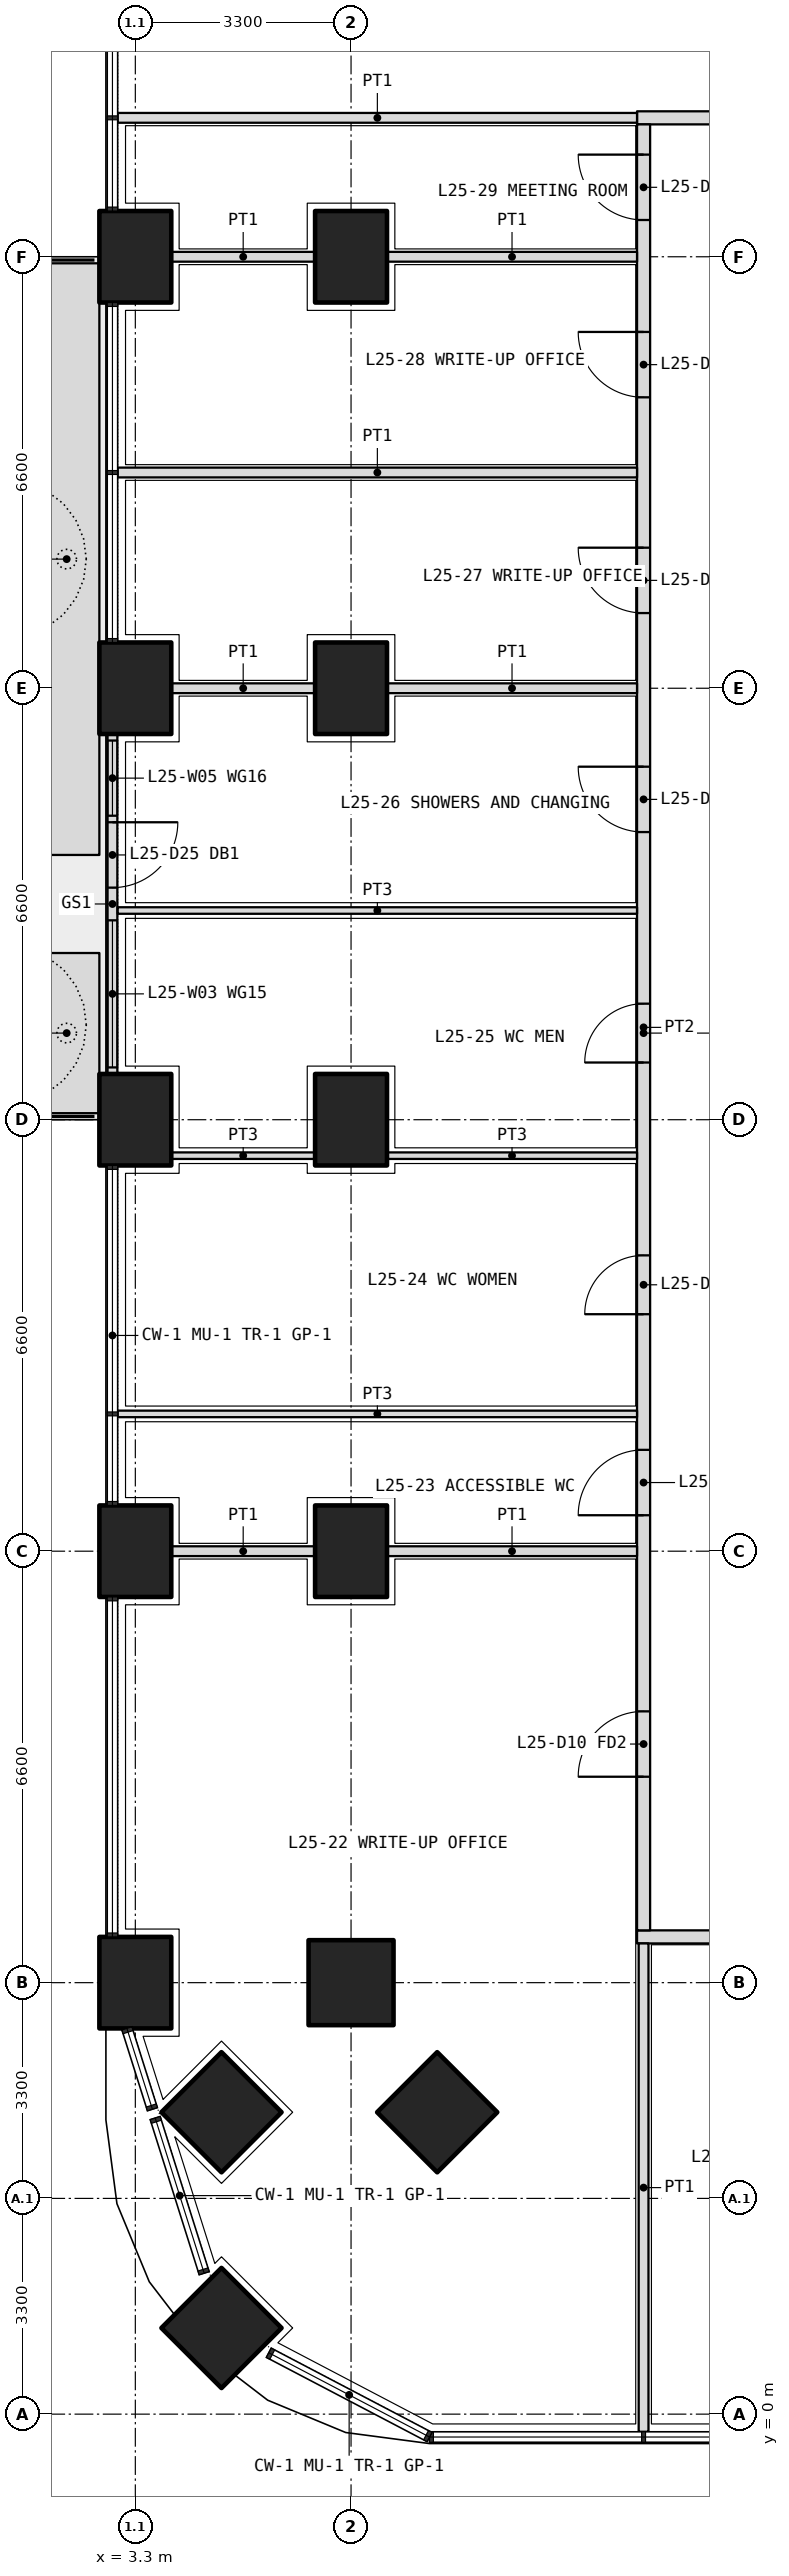
"""IFC4 building model, lengths in metres.
Left out: names, types, materials, properties, quantities, classifications, styles, units other than length and angle.
Written with IfcOpenShell. Run it as: python <this file> out.ifc"""

import sys

from ifc_helpers import new_model, si_unit, direction, frame, frame_2d, origin, origin_2d, place, context, subcontext, project, spatial, polyline, rectangle, outline, extrude, element, fill, save


model = new_model("IFC4")
c1 = context("Model", 3, precision=1e-05, world=origin(), true_north=direction((0.0, 1.0)))
c2 = subcontext(c1, "Body", "Model", "MODEL_VIEW")
j1 = project(units=[si_unit("LENGTHUNIT", "METRE"), si_unit("PLANEANGLEUNIT", "RADIAN")], contexts=[c1])
p1 = place(None, origin())
s1 = spatial("IfcSite", under=j1, at=p1, CompositionType="ELEMENT")
p2 = place(p1, origin())
s2 = spatial("IfcBuilding", under=s1, at=p2, CompositionType="ELEMENT")
p3 = place(p2, frame((0.0, 0.0, 111.6)))
s3 = spatial("IfcBuildingStorey", under=s2, at=p3, CompositionType="ELEMENT", Elevation=111.6)
p4 = place(p3, frame((4.618, 1.318, 0.0), z_axis=(0.0, 0.0, 1.0), x_axis=(0.707106781187, 0.707106781187, 0.0)))
e1 = element("IfcColumn", 1, at=p4, inside=s3, PredefinedType="COLUMN", context=c2, shape_type="SweptSolid", body=[
    extrude(rectangle(XDim=1.3, YDim=1.3, at=origin_2d()), origin(), (0.0, 0.0, 1.0), 4.2),
])
for number, where, z_axis, x_axis in (
    (2, (3.3, 6.6, 0.0), (0.0, 0.0, 1.0), (0.0, 1.0, 0.0)),
    (3, (3.3, 13.2, 0.0), (0.0, 0.0, 1.0), (0.0, 1.0, 0.0)),
    (4, (3.3, 19.8, 0.0), (0.0, 0.0, 1.0), (0.0, 1.0, 0.0)),
    (5, (3.3, 26.4, 0.0), (0.0, 0.0, 1.0), (0.0, 1.0, 0.0)),
    (6, (3.3, 33.0, 0.0), (0.0, 0.0, 1.0), (0.0, 1.0, 0.0)),
):
    element("IfcColumn", number, at=place(p3, frame(where, z_axis=z_axis, x_axis=x_axis)), inside=s3, PredefinedType="COLUMN", context=c2, shape_type="SweptSolid", body=[
        extrude(rectangle(XDim=1.4, YDim=1.1, at=origin_2d()), origin(), (0.0, 0.0, 1.0), 4.2),
    ])
for number, where, z_axis, x_axis in (
    (7, (6.6, 6.6, 0.0), (0.0, 0.0, 1.0), (1.0, 0.0, 0.0)),
    (8, (4.618, 4.618, 0.0), (0.0, 0.0, 1.0), (0.707, 0.707, 0.0)),
    (9, (7.918, 4.618, 0.0), (0.0, 0.0, 1.0), (0.707, 0.707, 0.0)),
):
    element("IfcColumn", number, at=place(p3, frame(where, z_axis=z_axis, x_axis=x_axis)), inside=s3, PredefinedType="COLUMN", context=c2, shape_type="SweptSolid", body=[
        extrude(rectangle(XDim=1.3, YDim=1.3, at=origin_2d()), origin(), (0.0, 0.0, 1.0), 4.2),
    ])
for number, where, z_axis, x_axis in (
    (10, (6.6, 13.2, 0.0), (0.0, 0.0, 1.0), (0.0, 1.0, 0.0)),
    (11, (6.6, 19.8, 0.0), (0.0, 0.0, 1.0), (0.0, 1.0, 0.0)),
    (12, (6.6, 26.4, 0.0), (0.0, 0.0, 1.0), (0.0, 1.0, 0.0)),
    (13, (6.6, 33.0, 0.0), (0.0, 0.0, 1.0), (0.0, 1.0, 0.0)),
):
    element("IfcColumn", number, at=place(p3, frame(where, z_axis=z_axis, x_axis=x_axis)), inside=s3, PredefinedType="COLUMN", context=c2, shape_type="SweptSolid", body=[
        extrude(rectangle(XDim=1.4, YDim=1.1, at=origin_2d()), origin(), (0.0, 0.0, 1.0), 4.2),
    ])
p5 = place(p3, origin())
e14 = element("IfcWall", 14, at=p5, inside=s3, PredefinedType="USERDEFINED", context=c2, shape_type="SweptSolid", body=[
    extrude(outline(polyline([(1.75, 19.9), (2.75, 19.9), (2.75, 22.35), (1.75, 22.35), (1.75, 19.9)]), holes=[polyline([(1.9, 20.05), (2.6, 20.05), (2.6, 22.2), (1.9, 22.2), (1.9, 20.05)])]), origin(), (0.0, 0.0, 1.0), 1.05),
])
p6 = place(p3, origin())
e15 = element("IfcWall", 15, at=p6, inside=s3, PredefinedType="USERDEFINED", context=c2, shape_type="SweptSolid", body=[
    extrude(outline(polyline([(1.75, 23.85), (2.75, 23.85), (2.75, 32.9), (1.75, 32.9), (1.75, 23.85)]), holes=[polyline([(1.9, 24.0), (2.6, 24.0), (2.6, 32.75), (1.9, 32.75), (1.9, 24.0)])]), origin(), (0.0, 0.0, 1.0), 1.05),
])
p7 = place(p3, frame((2.95, 25.7, 0.0), z_axis=(0.0, 0.0, 1.0), x_axis=(0.0, -1.0, 0.0)))
e16 = element("IfcWall", 16, at=p7, inside=s3, PredefinedType="SOLIDWALL", context=c2, shape_type="SweptSolid", body=[
    extrude(rectangle(XDim=5.2, YDim=0.15, at=frame_2d((2.6, 0.0))), origin(), (0.0, 0.0, 1.0), 2.7),
])
p8 = place(p7, frame((1.35, 0.0, 0.0)))
e17 = element("IfcOpeningElement", 17, at=p8, cuts=e16, PredefinedType="OPENING", context=c2, shape_type="SweptSolid", body=[
    extrude(rectangle(XDim=1.0, YDim=2.4, at=frame_2d((0.5, 1.2))), frame((0.0, 0.085, 0.0), z_axis=(0.0, -1.0, 0.0), x_axis=(1.0, 0.0, 0.0)), (0.0, 0.0, 1.0), 0.17),
])
p9 = place(p7, frame((0.1, 0.0, 0.1)))
e18 = element("IfcOpeningElement", 18, at=p9, cuts=e16, PredefinedType="OPENING", context=c2, shape_type="SweptSolid", body=[
    extrude(rectangle(XDim=1.15, YDim=2.3, at=frame_2d((0.575, 1.15))), frame((0.0, 0.085, 0.0), z_axis=(0.0, -1.0, 0.0), x_axis=(1.0, 0.0, 0.0)), (0.0, 0.0, 1.0), 0.17),
])
p10 = place(p7, frame((2.85, 0.0, 0.1)))
e19 = element("IfcOpeningElement", 19, at=p10, cuts=e16, PredefinedType="OPENING", context=c2, shape_type="SweptSolid", body=[
    extrude(rectangle(XDim=2.25, YDim=2.3, at=frame_2d((1.125, 1.15))), frame((0.0, 0.085, 0.0), z_axis=(0.0, -1.0, 0.0), x_axis=(1.0, 0.0, 0.0)), (0.0, 0.0, 1.0), 0.17),
])
p11 = place(p3, frame((10.975, 7.3, 0.0), z_axis=(0.0, 0.0, 1.0), x_axis=(1.0, 0.0, 0.0)))
e20 = element("IfcWall", 20, at=p11, inside=s3, PredefinedType="PARTITIONING", context=c2, shape_type="SweptSolid", body=[
    extrude(rectangle(XDim=12.125, YDim=0.2, at=frame_2d((6.062, 0.0))), origin(), (0.0, 0.0, 1.0), 2.85),
])
p12 = place(p11, frame((2.312, 0.0, 0.0)))
e21 = element("IfcOpeningElement", 21, at=p12, cuts=e20, PredefinedType="OPENING", context=c2, shape_type="SweptSolid", body=[
    extrude(rectangle(XDim=1.0, YDim=2.1, at=frame_2d((0.5, 1.05))), frame((0.0, 0.11, 0.0), z_axis=(0.0, -1.0, 0.0), x_axis=(1.0, 0.0, 0.0)), (0.0, 0.0, 1.0), 0.22),
])
p13 = place(p11, frame((7.125, 0.0, 0.0)))
e22 = element("IfcOpeningElement", 22, at=p13, cuts=e20, PredefinedType="OPENING", context=c2, shape_type="SweptSolid", body=[
    extrude(rectangle(XDim=1.0, YDim=2.1, at=frame_2d((0.5, 1.05))), frame((0.0, 0.11, 0.0), z_axis=(0.0, -1.0, 0.0), x_axis=(1.0, 0.0, 0.0)), (0.0, 0.0, 1.0), 0.22),
])
p14 = place(p11, frame((10.425, 0.0, 0.0)))
e23 = element("IfcOpeningElement", 23, at=p14, cuts=e20, PredefinedType="OPENING", context=c2, shape_type="SweptSolid", body=[
    extrude(rectangle(XDim=1.0, YDim=2.1, at=frame_2d((0.5, 1.05))), frame((0.0, 0.11, 0.0), z_axis=(0.0, -1.0, 0.0), x_axis=(1.0, 0.0, 0.0)), (0.0, 0.0, 1.0), 0.22),
])
p15 = place(p3, frame((10.975, 35.125, 0.0), z_axis=(0.0, 0.0, 1.0), x_axis=(1.0, 0.0, 0.0)))
e24 = element("IfcWall", 24, at=p15, inside=s3, PredefinedType="PARTITIONING", context=c2, shape_type="SweptSolid", body=[
    extrude(rectangle(XDim=30.85, YDim=0.2, at=frame_2d((15.425, 0.0))), origin(), (0.0, 0.0, 1.0), 2.85),
])
p16 = place(p15, frame((3.962, 0.0, 0.0)))
e25 = element("IfcOpeningElement", 25, at=p16, cuts=e24, PredefinedType="OPENING", context=c2, shape_type="SweptSolid", body=[
    extrude(rectangle(XDim=1.0, YDim=2.1, at=frame_2d((0.5, 1.05))), frame((0.0, 0.11, 0.0), z_axis=(0.0, -1.0, 0.0), x_axis=(1.0, 0.0, 0.0)), (0.0, 0.0, 1.0), 0.22),
])
p17 = place(p15, frame((9.975, 0.0, 0.0)))
e26 = element("IfcOpeningElement", 26, at=p17, cuts=e24, PredefinedType="OPENING", context=c2, shape_type="SweptSolid", body=[
    extrude(rectangle(XDim=1.0, YDim=2.1, at=frame_2d((0.5, 1.05))), frame((0.0, 0.11, 0.0), z_axis=(0.0, -1.0, 0.0), x_axis=(1.0, 0.0, 0.0)), (0.0, 0.0, 1.0), 0.22),
])
p18 = place(p15, frame((14.825, 0.0, 0.0)))
e27 = element("IfcOpeningElement", 27, at=p18, cuts=e24, PredefinedType="OPENING", context=c2, shape_type="SweptSolid", body=[
    extrude(rectangle(XDim=1.2, YDim=2.1, at=frame_2d((0.6, 1.05))), frame((0.0, 0.11, 0.0), z_axis=(0.0, -1.0, 0.0), x_axis=(1.0, 0.0, 0.0)), (0.0, 0.0, 1.0), 0.22),
])
p19 = place(p15, frame((24.238, 0.0, 0.0)))
e28 = element("IfcOpeningElement", 28, at=p19, cuts=e24, PredefinedType="OPENING", context=c2, shape_type="SweptSolid", body=[
    extrude(rectangle(XDim=1.0, YDim=2.1, at=frame_2d((0.5, 1.05))), frame((0.0, 0.11, 0.0), z_axis=(0.0, -1.0, 0.0), x_axis=(1.0, 0.0, 0.0)), (0.0, 0.0, 1.0), 0.22),
])
p20 = place(p3, frame((11.075, 7.4, 0.0), z_axis=(0.0, 0.0, 1.0), x_axis=(0.0, 1.0, 0.0)))
e29 = element("IfcWall", 29, at=p20, inside=s3, PredefinedType="PARTITIONING", context=c2, shape_type="SweptSolid", body=[
    extrude(rectangle(XDim=27.625, YDim=0.2, at=frame_2d((13.812, 0.0))), origin(), (0.0, 0.0, 1.0), 2.85),
])
p21 = place(p20, frame((2.35, 0.0, 0.0)))
e30 = element("IfcOpeningElement", 30, at=p21, cuts=e29, PredefinedType="OPENING", context=c2, shape_type="SweptSolid", body=[
    extrude(rectangle(XDim=1.0, YDim=2.1, at=frame_2d((0.5, 1.05))), frame((0.0, 0.11, 0.0), z_axis=(0.0, -1.0, 0.0), x_axis=(1.0, 0.0, 0.0)), (0.0, 0.0, 1.0), 0.22),
])
p22 = place(p20, frame((6.35, 0.0, 0.0)))
e31 = element("IfcOpeningElement", 31, at=p22, cuts=e29, PredefinedType="OPENING", context=c2, shape_type="SweptSolid", body=[
    extrude(rectangle(XDim=1.0, YDim=2.1, at=frame_2d((0.5, 1.05))), frame((0.0, 0.11, 0.0), z_axis=(0.0, -1.0, 0.0), x_axis=(1.0, 0.0, 0.0)), (0.0, 0.0, 1.0), 0.22),
])
p23 = place(p20, frame((9.425, 0.0, 0.0)))
e32 = element("IfcOpeningElement", 32, at=p23, cuts=e29, PredefinedType="OPENING", context=c2, shape_type="SweptSolid", body=[
    extrude(rectangle(XDim=0.9, YDim=2.1, at=frame_2d((0.45, 1.05))), frame((0.0, 0.11, 0.0), z_axis=(0.0, -1.0, 0.0), x_axis=(1.0, 0.0, 0.0)), (0.0, 0.0, 1.0), 0.22),
])
p24 = place(p20, frame((13.275, 0.0, 0.0)))
e33 = element("IfcOpeningElement", 33, at=p24, cuts=e29, PredefinedType="OPENING", context=c2, shape_type="SweptSolid", body=[
    extrude(rectangle(XDim=0.9, YDim=2.1, at=frame_2d((0.45, 1.05))), frame((0.0, 0.11, 0.0), z_axis=(0.0, -1.0, 0.0), x_axis=(1.0, 0.0, 0.0)), (0.0, 0.0, 1.0), 0.22),
])
p25 = place(p20, frame((16.8, 0.0, 0.0)))
e34 = element("IfcOpeningElement", 34, at=p25, cuts=e29, PredefinedType="OPENING", context=c2, shape_type="SweptSolid", body=[
    extrude(rectangle(XDim=1.0, YDim=2.1, at=frame_2d((0.5, 1.05))), frame((0.0, 0.11, 0.0), z_axis=(0.0, -1.0, 0.0), x_axis=(1.0, 0.0, 0.0)), (0.0, 0.0, 1.0), 0.22),
])
p26 = place(p20, frame((20.15, 0.0, 0.0)))
e35 = element("IfcOpeningElement", 35, at=p26, cuts=e29, PredefinedType="OPENING", context=c2, shape_type="SweptSolid", body=[
    extrude(rectangle(XDim=1.0, YDim=2.1, at=frame_2d((0.5, 1.05))), frame((0.0, 0.11, 0.0), z_axis=(0.0, -1.0, 0.0), x_axis=(1.0, 0.0, 0.0)), (0.0, 0.0, 1.0), 0.22),
])
p27 = place(p20, frame((23.45, 0.0, 0.0)))
e36 = element("IfcOpeningElement", 36, at=p27, cuts=e29, PredefinedType="OPENING", context=c2, shape_type="SweptSolid", body=[
    extrude(rectangle(XDim=1.0, YDim=2.1, at=frame_2d((0.5, 1.05))), frame((0.0, 0.11, 0.0), z_axis=(0.0, -1.0, 0.0), x_axis=(1.0, 0.0, 0.0)), (0.0, 0.0, 1.0), 0.22),
])
p28 = place(p20, frame((26.163, 0.0, 0.0)))
e37 = element("IfcOpeningElement", 37, at=p28, cuts=e29, PredefinedType="OPENING", context=c2, shape_type="SweptSolid", body=[
    extrude(rectangle(XDim=1.0, YDim=2.1, at=frame_2d((0.5, 1.05))), frame((0.0, 0.11, 0.0), z_axis=(0.0, -1.0, 0.0), x_axis=(1.0, 0.0, 0.0)), (0.0, 0.0, 1.0), 0.22),
])
p29 = place(p3, frame((11.075, -0.27, 0.0), z_axis=(0.0, 0.0, 1.0), x_axis=(0.0, 1.0, 0.0)))
e38 = element("IfcWall", 38, at=p29, inside=s3, PredefinedType="PARTITIONING", context=c2, shape_type="SweptSolid", body=[
    extrude(rectangle(XDim=7.47, YDim=0.15, at=frame_2d((3.735, 0.0))), origin(), (0.0, 0.0, 1.0), 2.7),
])
p30 = place(p3, frame((3.03, 35.125, 0.0), z_axis=(0.0, 0.0, 1.0), x_axis=(1.0, 0.0, 0.0)))
e39 = element("IfcWall", 39, at=p30, inside=s3, PredefinedType="PARTITIONING", context=c2, shape_type="SweptSolid", body=[
    extrude(rectangle(XDim=7.945, YDim=0.15, at=frame_2d((3.973, 0.0))), origin(), (0.0, 0.0, 1.0), 2.7),
])
p31 = place(p3, frame((3.03, 15.3, 0.0), z_axis=(0.0, 0.0, 1.0), x_axis=(1.0, 0.0, 0.0)))
e40 = element("IfcWall", 40, at=p31, inside=s3, PredefinedType="PARTITIONING", context=c2, shape_type="SweptSolid", body=[
    extrude(rectangle(XDim=7.945, YDim=0.1, at=frame_2d((3.973, 0.0))), origin(), (0.0, 0.0, 1.0), 2.7),
])
p32 = place(p3, frame((3.85, 19.25, 0.0), z_axis=(0.0, 0.0, 1.0), x_axis=(1.0, 0.0, 0.0)))
e41 = element("IfcWall", 41, at=p32, inside=s3, PredefinedType="PARTITIONING", context=c2, shape_type="SweptSolid", body=[
    extrude(rectangle(XDim=2.2, YDim=0.1, at=frame_2d((1.1, 0.0))), origin(), (0.0, 0.0, 1.0), 2.85),
])
p33 = place(p3, frame((7.15, 19.25, 0.0), z_axis=(0.0, 0.0, 1.0), x_axis=(1.0, 0.0, 0.0)))
e42 = element("IfcWall", 42, at=p33, inside=s3, PredefinedType="PARTITIONING", context=c2, shape_type="SweptSolid", body=[
    extrude(rectangle(XDim=3.825, YDim=0.1, at=frame_2d((1.913, 0.0))), origin(), (0.0, 0.0, 1.0), 2.85),
])
p34 = place(p3, frame((3.03, 23.0, 0.0), z_axis=(0.0, 0.0, 1.0), x_axis=(1.0, 0.0, 0.0)))
e43 = element("IfcWall", 43, at=p34, inside=s3, PredefinedType="PARTITIONING", context=c2, shape_type="SweptSolid", body=[
    extrude(rectangle(XDim=7.945, YDim=0.1, at=frame_2d((3.973, 0.0))), origin(), (0.0, 0.0, 1.0), 2.7),
])
p35 = place(p3, frame((3.85, 13.2, 0.0), z_axis=(0.0, 0.0, 1.0), x_axis=(1.0, 0.0, 0.0)))
e44 = element("IfcWall", 44, at=p35, inside=s3, PredefinedType="PARTITIONING", context=c2, shape_type="SweptSolid", body=[
    extrude(rectangle(XDim=2.2, YDim=0.15, at=frame_2d((1.1, 0.0))), origin(), (0.0, 0.0, 1.0), 2.85),
])
p36 = place(p3, frame((7.15, 13.2, 0.0), z_axis=(0.0, 0.0, 1.0), x_axis=(1.0, 0.0, 0.0)))
e45 = element("IfcWall", 45, at=p36, inside=s3, PredefinedType="PARTITIONING", context=c2, shape_type="SweptSolid", body=[
    extrude(rectangle(XDim=3.825, YDim=0.15, at=frame_2d((1.913, 0.0))), origin(), (0.0, 0.0, 1.0), 2.85),
])
p37 = place(p3, frame((3.85, 26.4, 0.0), z_axis=(0.0, 0.0, 1.0), x_axis=(1.0, 0.0, 0.0)))
e46 = element("IfcWall", 46, at=p37, inside=s3, PredefinedType="PARTITIONING", context=c2, shape_type="SweptSolid", body=[
    extrude(rectangle(XDim=2.2, YDim=0.15, at=frame_2d((1.1, 0.0))), origin(), (0.0, 0.0, 1.0), 2.85),
])
p38 = place(p3, frame((7.15, 26.4, 0.0), z_axis=(0.0, 0.0, 1.0), x_axis=(1.0, 0.0, 0.0)))
e47 = element("IfcWall", 47, at=p38, inside=s3, PredefinedType="PARTITIONING", context=c2, shape_type="SweptSolid", body=[
    extrude(rectangle(XDim=3.825, YDim=0.15, at=frame_2d((1.913, 0.0))), origin(), (0.0, 0.0, 1.0), 2.85),
])
p39 = place(p3, frame((3.03, 29.7, 0.0), z_axis=(0.0, 0.0, 1.0), x_axis=(1.0, 0.0, 0.0)))
e48 = element("IfcWall", 48, at=p39, inside=s3, PredefinedType="PARTITIONING", context=c2, shape_type="SweptSolid", body=[
    extrude(rectangle(XDim=7.945, YDim=0.15, at=frame_2d((3.973, 0.0))), origin(), (0.0, 0.0, 1.0), 2.7),
])
p40 = place(p3, frame((3.85, 33.0, 0.0), z_axis=(0.0, 0.0, 1.0), x_axis=(1.0, 0.0, 0.0)))
e49 = element("IfcWall", 49, at=p40, inside=s3, PredefinedType="PARTITIONING", context=c2, shape_type="SweptSolid", body=[
    extrude(rectangle(XDim=2.2, YDim=0.15, at=frame_2d((1.1, 0.0))), origin(), (0.0, 0.0, 1.0), 2.85),
])
p41 = place(p3, frame((7.15, 33.0, 0.0), z_axis=(0.0, 0.0, 1.0), x_axis=(1.0, 0.0, 0.0)))
e50 = element("IfcWall", 50, at=p41, inside=s3, PredefinedType="PARTITIONING", context=c2, shape_type="SweptSolid", body=[
    extrude(rectangle(XDim=3.825, YDim=0.15, at=frame_2d((1.913, 0.0))), origin(), (0.0, 0.0, 1.0), 2.85),
])
p42 = place(p8, origin())
e51 = element("IfcDoor", 51, at=p42, inside=s3, OperationType="SINGLE_SWING_LEFT", PredefinedType="DOOR", context=c2, shape_type="SweptSolid", body=[
    extrude(rectangle(XDim=1.0, YDim=2.4, at=frame_2d((0.5, 1.2))), frame((0.0, 0.025, 0.0), z_axis=(0.0, -1.0, 0.0), x_axis=(1.0, 0.0, 0.0)), (0.0, 0.0, 1.0), 0.05),
])
fill(e17, e51)
p43 = place(p9, origin())
e52 = element("IfcWindow", 52, at=p43, inside=s3, PartitioningType="SINGLE_PANEL", PredefinedType="WINDOW", context=c2, shape_type="SweptSolid", body=[
    extrude(rectangle(XDim=1.15, YDim=2.3, at=frame_2d((0.575, 1.15))), frame((0.0, 0.03, 0.0), z_axis=(0.0, -1.0, 0.0), x_axis=(1.0, 0.0, 0.0)), (0.0, 0.0, 1.0), 0.06),
])
fill(e18, e52)
p44 = place(p10, origin())
e53 = element("IfcWindow", 53, at=p44, inside=s3, PartitioningType="SINGLE_PANEL", PredefinedType="WINDOW", context=c2, shape_type="SweptSolid", body=[
    extrude(rectangle(XDim=2.25, YDim=2.3, at=frame_2d((1.125, 1.15))), frame((0.0, 0.03, 0.0), z_axis=(0.0, -1.0, 0.0), x_axis=(1.0, 0.0, 0.0)), (0.0, 0.0, 1.0), 0.06),
])
fill(e19, e53)
p45 = place(p21, origin())
e54 = element("IfcDoor", 54, at=p45, inside=s3, OperationType="SINGLE_SWING_LEFT", PredefinedType="DOOR", context=c2, shape_type="SweptSolid", body=[
    extrude(rectangle(XDim=1.0, YDim=2.1, at=frame_2d((0.5, 1.05))), frame((0.0, 0.025, 0.0), z_axis=(0.0, -1.0, 0.0), x_axis=(1.0, 0.0, 0.0)), (0.0, 0.0, 1.0), 0.05),
])
fill(e30, e54)
p46 = place(p22, origin())
e55 = element("IfcDoor", 55, at=p46, inside=s3, OperationType="SINGLE_SWING_LEFT", PredefinedType="DOOR", context=c2, shape_type="SweptSolid", body=[
    extrude(rectangle(XDim=1.0, YDim=2.1, at=frame_2d((0.5, 1.05))), frame((0.0, 0.025, 0.0), z_axis=(0.0, -1.0, 0.0), x_axis=(1.0, 0.0, 0.0)), (0.0, 0.0, 1.0), 0.05),
])
fill(e31, e55)
p47 = place(p23, origin())
e56 = element("IfcDoor", 56, at=p47, inside=s3, OperationType="SINGLE_SWING_LEFT", PredefinedType="DOOR", context=c2, shape_type="SweptSolid", body=[
    extrude(rectangle(XDim=0.9, YDim=2.1, at=frame_2d((0.45, 1.05))), frame((0.0, 0.025, 0.0), z_axis=(0.0, -1.0, 0.0), x_axis=(1.0, 0.0, 0.0)), (0.0, 0.0, 1.0), 0.05),
])
fill(e32, e56)
p48 = place(p24, origin())
e57 = element("IfcDoor", 57, at=p48, inside=s3, OperationType="SINGLE_SWING_LEFT", PredefinedType="DOOR", context=c2, shape_type="SweptSolid", body=[
    extrude(rectangle(XDim=0.9, YDim=2.1, at=frame_2d((0.45, 1.05))), frame((0.0, 0.025, 0.0), z_axis=(0.0, -1.0, 0.0), x_axis=(1.0, 0.0, 0.0)), (0.0, 0.0, 1.0), 0.05),
])
fill(e33, e57)
p49 = place(p25, origin())
e58 = element("IfcDoor", 58, at=p49, inside=s3, OperationType="SINGLE_SWING_RIGHT", PredefinedType="DOOR", context=c2, shape_type="SweptSolid", body=[
    extrude(rectangle(XDim=1.0, YDim=2.1, at=frame_2d((0.5, 1.05))), frame((0.0, 0.025, 0.0), z_axis=(0.0, -1.0, 0.0), x_axis=(1.0, 0.0, 0.0)), (0.0, 0.0, 1.0), 0.05),
])
fill(e34, e58)
p50 = place(p26, origin())
e59 = element("IfcDoor", 59, at=p50, inside=s3, OperationType="SINGLE_SWING_RIGHT", PredefinedType="DOOR", context=c2, shape_type="SweptSolid", body=[
    extrude(rectangle(XDim=1.0, YDim=2.1, at=frame_2d((0.5, 1.05))), frame((0.0, 0.025, 0.0), z_axis=(0.0, -1.0, 0.0), x_axis=(1.0, 0.0, 0.0)), (0.0, 0.0, 1.0), 0.05),
])
fill(e35, e59)
p51 = place(p27, origin())
e60 = element("IfcDoor", 60, at=p51, inside=s3, OperationType="SINGLE_SWING_RIGHT", PredefinedType="DOOR", context=c2, shape_type="SweptSolid", body=[
    extrude(rectangle(XDim=1.0, YDim=2.1, at=frame_2d((0.5, 1.05))), frame((0.0, 0.025, 0.0), z_axis=(0.0, -1.0, 0.0), x_axis=(1.0, 0.0, 0.0)), (0.0, 0.0, 1.0), 0.05),
])
fill(e36, e60)
p52 = place(p28, origin())
e61 = element("IfcDoor", 61, at=p52, inside=s3, OperationType="SINGLE_SWING_RIGHT", PredefinedType="DOOR", context=c2, shape_type="SweptSolid", body=[
    extrude(rectangle(XDim=1.0, YDim=2.1, at=frame_2d((0.5, 1.05))), frame((0.0, 0.025, 0.0), z_axis=(0.0, -1.0, 0.0), x_axis=(1.0, 0.0, 0.0)), (0.0, 0.0, 1.0), 0.05),
])
fill(e37, e61)
save(model, sys.argv[1])
